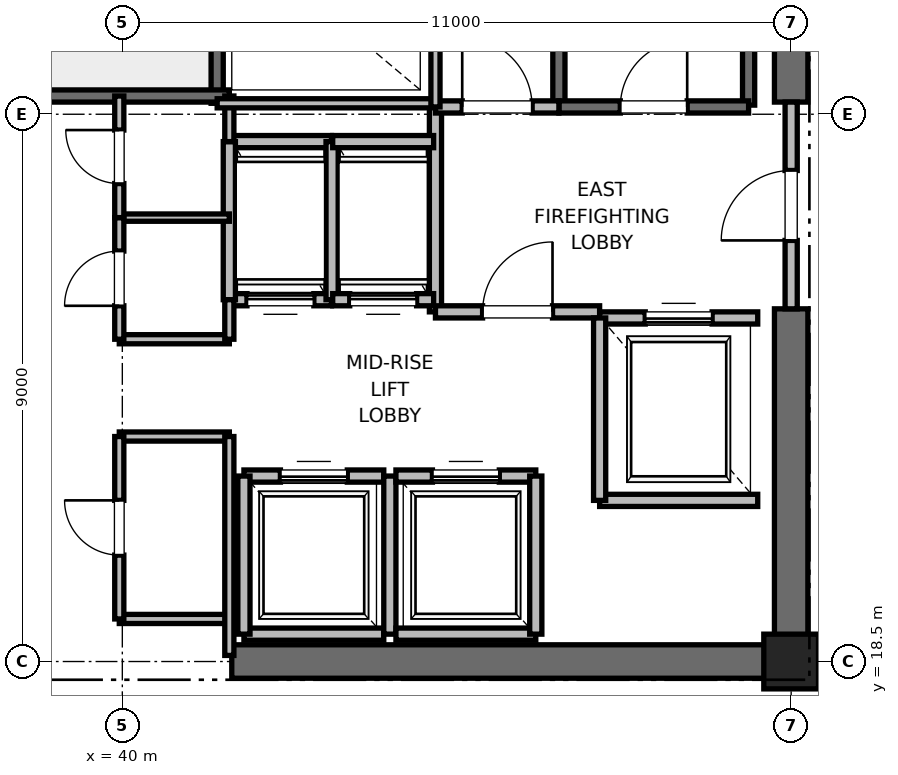
"""IFC4 building model, lengths in metres.
Left out: names, types, materials, properties, quantities, classifications, styles, units other than length and angle.
Written with IfcOpenShell. Run it as: python <this file> out.ifc"""

import sys

from ifc_helpers import new_model, si_unit, direction, frame, frame_2d, origin, origin_2d, place, context, subcontext, project, spatial, rectangle, extrude, element, fill, save


model = new_model("IFC4")
c1 = context("Model", 3, precision=1e-05, world=origin(), true_north=direction((0.0, 1.0)))
c2 = subcontext(c1, "Body", "Model", "MODEL_VIEW")
j1 = project(units=[si_unit("LENGTHUNIT", "METRE"), si_unit("PLANEANGLEUNIT", "RADIAN")], contexts=[c1])
p1 = place(None, origin())
s1 = spatial("IfcSite", under=j1, at=p1, CompositionType="ELEMENT")
p2 = place(p1, origin())
s2 = spatial("IfcBuilding", under=s1, at=p2, CompositionType="ELEMENT")
p3 = place(p2, frame((0.0, 0.0, 225.2)))
s3 = spatial("IfcBuildingStorey", under=s2, at=p3, CompositionType="ELEMENT", Elevation=225.2)
p4 = place(p3, frame((51.0, 18.5, 0.0), z_axis=(0.0, 0.0, 1.0), x_axis=(1.0, 0.0, 0.0)))
e1 = element("IfcColumn", 1, at=p4, inside=s3, PredefinedType="PILASTER", context=c2, shape_type="SweptSolid", body=[
    extrude(rectangle(XDim=0.9, YDim=0.9, at=origin_2d()), origin(), (0.0, 0.0, 1.0), 4.0),
])
p5 = place(p3, frame((41.8, 18.5, 0.0), z_axis=(0.0, 0.0, 1.0), x_axis=(1.0, 0.0, 0.0)))
e2 = element("IfcWall", 2, at=p5, inside=s3, PredefinedType="SHEAR", context=c2, shape_type="SweptSolid", body=[
    extrude(rectangle(XDim=9.2, YDim=0.55, at=frame_2d((4.6, 0.0))), origin(), (0.0, 0.0, 1.0), 3.775),
])
p6 = place(p3, frame((51.0, 18.5, 0.0), z_axis=(0.0, 0.0, 1.0), x_axis=(0.0, 1.0, 0.0)))
e3 = element("IfcWall", 3, at=p6, inside=s3, PredefinedType="SHEAR", context=c2, shape_type="SweptSolid", body=[
    extrude(rectangle(XDim=5.8, YDim=0.55, at=frame_2d((2.9, 0.0))), origin(), (0.0, 0.0, 1.0), 3.775),
])
p7 = place(p3, frame((51.0, 27.7, 0.0), z_axis=(0.0, 0.0, 1.0), x_axis=(0.0, 1.0, 0.0)))
e4 = element("IfcWall", 4, at=p7, inside=s3, PredefinedType="SHEAR", context=c2, shape_type="SweptSolid", body=[
    extrude(rectangle(XDim=8.8, YDim=0.55, at=frame_2d((4.4, 0.0))), origin(), (0.0, 0.0, 1.0), 3.775),
])
p8 = place(p3, frame((50.3, 27.65, 0.0), z_axis=(0.0, 0.0, 1.0), x_axis=(0.0, 1.0, 0.0)))
e5 = element("IfcWall", 5, at=p8, inside=s3, PredefinedType="SOLIDWALL", context=c2, shape_type="SweptSolid", body=[
    extrude(rectangle(XDim=8.15, YDim=0.2, at=frame_2d((4.075, 0.0))), origin(), (0.0, 0.0, 1.0), 3.775),
])
p9 = place(p3, frame((47.18, 27.62, 0.0), z_axis=(0.0, 0.0, 1.0), x_axis=(0.0, 1.0, 0.0)))
e6 = element("IfcWall", 6, at=p9, inside=s3, PredefinedType="SOLIDWALL", context=c2, shape_type="SweptSolid", body=[
    extrude(rectangle(XDim=8.18, YDim=0.2, at=frame_2d((4.09, 0.0))), origin(), (0.0, 0.0, 1.0), 3.775),
])
p10 = place(p3, frame((47.18, 27.62, 0.0), z_axis=(0.0, 0.0, 1.0), x_axis=(1.0, 0.0, 0.0)))
e7 = element("IfcWall", 7, at=p10, inside=s3, PredefinedType="SOLIDWALL", context=c2, shape_type="SweptSolid", body=[
    extrude(rectangle(XDim=3.12, YDim=0.2, at=frame_2d((1.56, 0.0))), origin(), (0.0, 0.0, 1.0), 3.775),
])
p11 = place(p10, frame((1.01, 0.0, 0.0)))
e8 = element("IfcOpeningElement", 8, at=p11, cuts=e7, PredefinedType="OPENING", context=c2, shape_type="SweptSolid", body=[
    extrude(rectangle(XDim=1.1, YDim=2.15, at=frame_2d((0.55, 1.075))), frame((0.0, 0.1, 0.0), z_axis=(0.0, -1.0, 0.0), x_axis=(1.0, 0.0, 0.0)), (0.0, 0.0, 1.0), 0.2),
])
p12 = place(p3, frame((41.56, 27.68, 0.0), z_axis=(0.0, 0.0, 1.0), x_axis=(0.0, 1.0, 0.0)))
e9 = element("IfcWall", 9, at=p12, inside=s3, PredefinedType="SOLIDWALL", context=c2, shape_type="SweptSolid", body=[
    extrude(rectangle(XDim=8.57, YDim=0.2, at=frame_2d((4.285, 0.0))), origin(), (0.0, 0.0, 1.0), 3.775),
])
p13 = place(p3, frame((38.44, 27.8, 0.0), z_axis=(0.0, 0.0, 1.0), x_axis=(1.0, 0.0, 0.0)))
e10 = element("IfcWall", 10, at=p13, inside=s3, PredefinedType="SOLIDWALL", context=c2, shape_type="SweptSolid", body=[
    extrude(rectangle(XDim=3.32, YDim=0.2, at=frame_2d((1.66, 0.0))), origin(), (0.0, 0.0, 1.0), 3.775),
])
p14 = place(p3, frame((45.15, 24.25, 0.0), z_axis=(0.0, 0.0, 1.0), x_axis=(0.0, 1.0, 0.0)))
e11 = element("IfcWall", 11, at=p14, inside=s3, PredefinedType="PARTITIONING", context=c2, shape_type="SweptSolid", body=[
    extrude(rectangle(XDim=3.37, YDim=0.2, at=frame_2d((1.685, 0.0))), origin(), (0.0, 0.0, 1.0), 3.775),
])
p15 = place(p3, frame((45.15, 24.25, 0.0), z_axis=(0.0, 0.0, 1.0), x_axis=(1.0, 0.0, 0.0)))
e12 = element("IfcWall", 12, at=p15, inside=s3, PredefinedType="PARTITIONING", context=c2, shape_type="SweptSolid", body=[
    extrude(rectangle(XDim=2.7, YDim=0.2, at=frame_2d((1.35, 0.0))), origin(), (0.0, 0.0, 1.0), 3.775),
])
p16 = place(p15, frame((0.775, 0.0, 0.0)))
e13 = element("IfcOpeningElement", 13, at=p16, cuts=e12, PredefinedType="OPENING", context=c2, shape_type="SweptSolid", body=[
    extrude(rectangle(XDim=1.15, YDim=2.2, at=frame_2d((0.575, 1.1))), frame((0.0, 0.1, 0.0), z_axis=(0.0, -1.0, 0.0), x_axis=(1.0, 0.0, 0.0)), (0.0, 0.0, 1.0), 0.2),
])
p17 = place(p3, frame((45.15, 27.62, 0.0), z_axis=(0.0, 0.0, 1.0), x_axis=(1.0, 0.0, 0.0)))
e14 = element("IfcWall", 14, at=p17, inside=s3, PredefinedType="PARTITIONING", context=c2, shape_type="SweptSolid", body=[
    extrude(rectangle(XDim=2.03, YDim=0.2, at=frame_2d((1.015, 0.0))), origin(), (0.0, 0.0, 1.0), 3.775),
])
p18 = place(p17, frame((0.44, 0.0, 0.0)))
e15 = element("IfcOpeningElement", 15, at=p18, cuts=e14, PredefinedType="OPENING", context=c2, shape_type="SweptSolid", body=[
    extrude(rectangle(XDim=1.15, YDim=2.2, at=frame_2d((0.575, 1.1))), frame((0.0, 0.1, 0.0), z_axis=(0.0, -1.0, 0.0), x_axis=(1.0, 0.0, 0.0)), (0.0, 0.0, 1.0), 0.2),
])
p19 = place(p3, frame((51.0, 24.3, 0.0), z_axis=(0.0, 0.0, 1.0), x_axis=(0.0, 1.0, 0.0)))
e16 = element("IfcWall", 16, at=p19, inside=s3, PredefinedType="PARTITIONING", context=c2, shape_type="SweptSolid", body=[
    extrude(rectangle(XDim=3.4, YDim=0.2, at=frame_2d((1.7, 0.0))), origin(), (0.0, 0.0, 1.0), 2.755),
])
p20 = place(p19, frame((1.125, 0.0, 0.0)))
e17 = element("IfcOpeningElement", 17, at=p20, cuts=e16, PredefinedType="OPENING", context=c2, shape_type="SweptSolid", body=[
    extrude(rectangle(XDim=1.15, YDim=2.2, at=frame_2d((0.575, 1.1))), frame((0.0, 0.1, 0.0), z_axis=(0.0, -1.0, 0.0), x_axis=(1.0, 0.0, 0.0)), (0.0, 0.0, 1.0), 0.2),
])
p21 = place(p3, frame((47.85, 21.15, 0.0), z_axis=(0.0, 0.0, 1.0), x_axis=(1.0, 0.0, 0.0)))
e18 = element("IfcWall", 18, at=p21, inside=s3, PredefinedType="SOLIDWALL", context=c2, shape_type="SweptSolid", body=[
    extrude(rectangle(XDim=2.6, YDim=0.2, at=frame_2d((1.3, 0.0))), origin(), (0.0, 0.0, 1.0), 3.775),
])
p22 = place(p3, frame((50.45, 24.15, 0.0), z_axis=(0.0, 0.0, 1.0), x_axis=(-1.0, 0.0, 0.0)))
e19 = element("IfcWall", 19, at=p22, inside=s3, PredefinedType="SOLIDWALL", context=c2, shape_type="SweptSolid", body=[
    extrude(rectangle(XDim=2.6, YDim=0.2, at=frame_2d((1.3, 0.0))), origin(), (0.0, 0.0, 1.0), 2.755),
])
p23 = place(p22, frame((0.75, 0.0, 0.0)))
e20 = element("IfcOpeningElement", 20, at=p23, cuts=e19, PredefinedType="OPENING", context=c2, shape_type="SweptSolid", body=[
    extrude(rectangle(XDim=1.1, YDim=2.2, at=frame_2d((0.55, 1.1))), frame((0.0, 0.1, 0.0), z_axis=(0.0, -1.0, 0.0), x_axis=(1.0, 0.0, 0.0)), (0.0, 0.0, 1.0), 0.2),
])
p24 = place(p3, frame((47.85, 24.15, 0.0), z_axis=(0.0, 0.0, 1.0), x_axis=(0.0, -1.0, 0.0)))
e21 = element("IfcWall", 21, at=p24, inside=s3, PredefinedType="SOLIDWALL", context=c2, shape_type="SweptSolid", body=[
    extrude(rectangle(XDim=3.0, YDim=0.2, at=frame_2d((1.5, 0.0))), origin(), (0.0, 0.0, 1.0), 3.775),
])
p25 = place(p3, frame((42.0, 18.95, 0.0), z_axis=(0.0, 0.0, 1.0), x_axis=(1.0, 0.0, 0.0)))
e22 = element("IfcWall", 22, at=p25, inside=s3, PredefinedType="SOLIDWALL", context=c2, shape_type="SweptSolid", body=[
    extrude(rectangle(XDim=2.3, YDim=0.2, at=frame_2d((1.15, 0.0))), origin(), (0.0, 0.0, 1.0), 2.755),
])
p26 = place(p3, frame((44.3, 21.55, 0.0), z_axis=(0.0, 0.0, 1.0), x_axis=(-1.0, 0.0, 0.0)))
e23 = element("IfcWall", 23, at=p26, inside=s3, PredefinedType="SOLIDWALL", context=c2, shape_type="SweptSolid", body=[
    extrude(rectangle(XDim=2.3, YDim=0.2, at=frame_2d((1.15, 0.0))), origin(), (0.0, 0.0, 1.0), 3.775),
])
p27 = place(p26, frame((0.6, 0.0, 0.0)))
e24 = element("IfcOpeningElement", 24, at=p27, cuts=e23, PredefinedType="OPENING", context=c2, shape_type="SweptSolid", body=[
    extrude(rectangle(XDim=1.1, YDim=2.2, at=frame_2d((0.55, 1.1))), frame((0.0, 0.1, 0.0), z_axis=(0.0, -1.0, 0.0), x_axis=(1.0, 0.0, 0.0)), (0.0, 0.0, 1.0), 0.2),
])
p28 = place(p3, frame((42.0, 21.55, 0.0), z_axis=(0.0, 0.0, 1.0), x_axis=(0.0, -1.0, 0.0)))
e25 = element("IfcWall", 25, at=p28, inside=s3, PredefinedType="SOLIDWALL", context=c2, shape_type="SweptSolid", body=[
    extrude(rectangle(XDim=2.6, YDim=0.2, at=frame_2d((1.3, 0.0))), origin(), (0.0, 0.0, 1.0), 2.755),
])
p29 = place(p3, frame((44.4, 18.95, 0.0), z_axis=(0.0, 0.0, 1.0), x_axis=(0.0, 1.0, 0.0)))
e26 = element("IfcWall", 26, at=p29, inside=s3, PredefinedType="SOLIDWALL", context=c2, shape_type="SweptSolid", body=[
    extrude(rectangle(XDim=2.6, YDim=0.2, at=frame_2d((1.3, 0.0))), origin(), (0.0, 0.0, 1.0), 3.775),
])
p30 = place(p3, frame((44.5, 18.95, 0.0), z_axis=(0.0, 0.0, 1.0), x_axis=(1.0, 0.0, 0.0)))
e27 = element("IfcWall", 27, at=p30, inside=s3, PredefinedType="SOLIDWALL", context=c2, shape_type="SweptSolid", body=[
    extrude(rectangle(XDim=2.3, YDim=0.2, at=frame_2d((1.15, 0.0))), origin(), (0.0, 0.0, 1.0), 3.775),
])
p31 = place(p3, frame((46.8, 21.55, 0.0), z_axis=(0.0, 0.0, 1.0), x_axis=(-1.0, 0.0, 0.0)))
e28 = element("IfcWall", 28, at=p31, inside=s3, PredefinedType="SOLIDWALL", context=c2, shape_type="SweptSolid", body=[
    extrude(rectangle(XDim=2.3, YDim=0.2, at=frame_2d((1.15, 0.0))), origin(), (0.0, 0.0, 1.0), 3.775),
])
p32 = place(p31, frame((0.6, 0.0, 0.0)))
e29 = element("IfcOpeningElement", 29, at=p32, cuts=e28, PredefinedType="OPENING", context=c2, shape_type="SweptSolid", body=[
    extrude(rectangle(XDim=1.1, YDim=2.2, at=frame_2d((0.55, 1.1))), frame((0.0, 0.1, 0.0), z_axis=(0.0, -1.0, 0.0), x_axis=(1.0, 0.0, 0.0)), (0.0, 0.0, 1.0), 0.2),
])
p33 = place(p3, frame((46.8, 18.95, 0.0), z_axis=(0.0, 0.0, 1.0), x_axis=(0.0, 1.0, 0.0)))
e30 = element("IfcWall", 30, at=p33, inside=s3, PredefinedType="SOLIDWALL", context=c2, shape_type="SweptSolid", body=[
    extrude(rectangle(XDim=2.6, YDim=0.2, at=frame_2d((1.3, 0.0))), origin(), (0.0, 0.0, 1.0), 3.775),
])
p34 = place(p3, frame((41.76, 24.45, 0.0), z_axis=(0.0, 0.0, 1.0), x_axis=(1.0, 0.0, 0.0)))
e31 = element("IfcWall", 31, at=p34, inside=s3, PredefinedType="SOLIDWALL", context=c2, shape_type="SweptSolid", body=[
    extrude(rectangle(XDim=1.68, YDim=0.2, at=frame_2d((0.84, 0.0))), origin(), (0.0, 0.0, 1.0), 3.775),
])
p35 = place(p34, frame((0.29, 0.0, 0.0)))
e32 = element("IfcOpeningElement", 32, at=p35, cuts=e31, PredefinedType="OPENING", context=c2, shape_type="SweptSolid", body=[
    extrude(rectangle(XDim=1.1, YDim=2.2, at=frame_2d((0.55, 1.1))), frame((0.0, 0.1, 0.0), z_axis=(0.0, -1.0, 0.0), x_axis=(1.0, 0.0, 0.0)), (0.0, 0.0, 1.0), 0.2),
])
p36 = place(p3, frame((43.44, 27.05, 0.0), z_axis=(0.0, 0.0, 1.0), x_axis=(-1.0, 0.0, 0.0)))
e33 = element("IfcWall", 33, at=p36, inside=s3, PredefinedType="SOLIDWALL", context=c2, shape_type="SweptSolid", body=[
    extrude(rectangle(XDim=1.68, YDim=0.2, at=frame_2d((0.84, 0.0))), origin(), (0.0, 0.0, 1.0), 3.775),
])
for number, where, z_axis, x_axis in (
    (34, (41.76, 27.05, 0.0), (0.0, 0.0, 1.0), (0.0, -1.0, 0.0)),
    (35, (43.45, 24.45, 0.0), (0.0, 0.0, 1.0), (0.0, 1.0, 0.0)),
):
    element("IfcWall", number, at=place(p3, frame(where, z_axis=z_axis, x_axis=x_axis)), inside=s3, PredefinedType="SOLIDWALL", context=c2, shape_type="SweptSolid", body=[
        extrude(rectangle(XDim=2.6, YDim=0.2, at=frame_2d((1.3, 0.0))), origin(), (0.0, 0.0, 1.0), 3.775),
    ])
p37 = place(p3, frame((43.46, 24.45, 0.0), z_axis=(0.0, 0.0, 1.0), x_axis=(1.0, 0.0, 0.0)))
e36 = element("IfcWall", 36, at=p37, inside=s3, PredefinedType="SOLIDWALL", context=c2, shape_type="SweptSolid", body=[
    extrude(rectangle(XDim=1.66, YDim=0.2, at=frame_2d((0.83, 0.0))), origin(), (0.0, 0.0, 1.0), 3.775),
])
p38 = place(p37, frame((0.28, 0.0, 0.0)))
e37 = element("IfcOpeningElement", 37, at=p38, cuts=e36, PredefinedType="OPENING", context=c2, shape_type="SweptSolid", body=[
    extrude(rectangle(XDim=1.1, YDim=2.2, at=frame_2d((0.55, 1.1))), frame((0.0, 0.1, 0.0), z_axis=(0.0, -1.0, 0.0), x_axis=(1.0, 0.0, 0.0)), (0.0, 0.0, 1.0), 0.2),
])
p39 = place(p3, frame((45.12, 27.05, 0.0), z_axis=(0.0, 0.0, 1.0), x_axis=(-1.0, 0.0, 0.0)))
e38 = element("IfcWall", 38, at=p39, inside=s3, PredefinedType="SOLIDWALL", context=c2, shape_type="SweptSolid", body=[
    extrude(rectangle(XDim=1.66, YDim=0.2, at=frame_2d((0.83, 0.0))), origin(), (0.0, 0.0, 1.0), 3.775),
])
for number, where, z_axis, x_axis in (
    (39, (39.95, 19.2, 0.0), (0.0, 0.0, 1.0), (1.0, 0.0, 0.0)),
    (40, (39.95, 22.2, 0.0), (0.0, 0.0, 1.0), (1.0, 0.0, 0.0)),
    (41, (39.95, 23.8, 0.0), (0.0, 0.0, 1.0), (1.0, 0.0, 0.0)),
):
    element("IfcWall", number, at=place(p3, frame(where, z_axis=z_axis, x_axis=x_axis)), inside=s3, PredefinedType="PARTITIONING", context=c2, shape_type="SweptSolid", body=[
        extrude(rectangle(XDim=1.81, YDim=0.15, at=frame_2d((0.905, 0.0))), origin(), (0.0, 0.0, 1.0), 2.85),
    ])
p40 = place(p3, frame((39.95, 25.8, 0.0), z_axis=(0.0, 0.0, 1.0), x_axis=(1.0, 0.0, 0.0)))
e42 = element("IfcWall", 42, at=p40, inside=s3, PredefinedType="PARTITIONING", context=c2, shape_type="SweptSolid", body=[
    extrude(rectangle(XDim=1.81, YDim=0.12, at=frame_2d((0.905, 0.0))), origin(), (0.0, 0.0, 1.0), 2.85),
])
p41 = place(p3, frame((41.76, 18.6, 0.0), z_axis=(0.0, 0.0, 1.0), x_axis=(0.0, 1.0, 0.0)))
e43 = element("IfcWall", 43, at=p41, inside=s3, PredefinedType="PARTITIONING", context=c2, shape_type="SweptSolid", body=[
    extrude(rectangle(XDim=3.6, YDim=0.15, at=frame_2d((1.8, 0.0))), origin(), (0.0, 0.0, 1.0), 2.755),
])
p42 = place(p3, frame((41.76, 23.8, 0.0), z_axis=(0.0, 0.0, 1.0), x_axis=(0.0, 1.0, 0.0)))
e44 = element("IfcWall", 44, at=p42, inside=s3, PredefinedType="PARTITIONING", context=c2, shape_type="SweptSolid", body=[
    extrude(rectangle(XDim=0.65, YDim=0.15, at=frame_2d((0.325, 0.0))), origin(), (0.0, 0.0, 1.0), 2.85),
])
p43 = place(p3, frame((41.76, 27.05, 0.0), z_axis=(0.0, 0.0, 1.0), x_axis=(0.0, 1.0, 0.0)))
e45 = element("IfcWall", 45, at=p43, inside=s3, PredefinedType="PARTITIONING", context=c2, shape_type="SweptSolid", body=[
    extrude(rectangle(XDim=0.75, YDim=0.15, at=frame_2d((0.375, 0.0))), origin(), (0.0, 0.0, 1.0), 2.85),
])
p44 = place(p3, frame((39.95, 19.2, 0.0), z_axis=(0.0, 0.0, 1.0), x_axis=(0.0, 1.0, 0.0)))
e46 = element("IfcWall", 46, at=p44, inside=s3, PredefinedType="PARTITIONING", context=c2, shape_type="SweptSolid", body=[
    extrude(rectangle(XDim=3.0, YDim=0.15, at=frame_2d((1.5, 0.0))), origin(), (0.0, 0.0, 1.0), 2.85),
])
p45 = place(p44, frame((1.05, 0.0, 0.0)))
e47 = element("IfcOpeningElement", 47, at=p45, cuts=e46, PredefinedType="OPENING", context=c2, shape_type="SweptSolid", body=[
    extrude(rectangle(XDim=0.9, YDim=2.1, at=frame_2d((0.45, 1.05))), frame((0.0, 0.075, 0.0), z_axis=(0.0, -1.0, 0.0), x_axis=(1.0, 0.0, 0.0)), (0.0, 0.0, 1.0), 0.15),
])
p46 = place(p3, frame((39.95, 23.8, 0.0), z_axis=(0.0, 0.0, 1.0), x_axis=(0.0, 1.0, 0.0)))
e48 = element("IfcWall", 48, at=p46, inside=s3, PredefinedType="PARTITIONING", context=c2, shape_type="SweptSolid", body=[
    extrude(rectangle(XDim=2.0, YDim=0.15, at=frame_2d((1.0, 0.0))), origin(), (0.0, 0.0, 1.0), 2.85),
])
p47 = place(p46, frame((0.55, 0.0, 0.0)))
e49 = element("IfcOpeningElement", 49, at=p47, cuts=e48, PredefinedType="OPENING", context=c2, shape_type="SweptSolid", body=[
    extrude(rectangle(XDim=0.9, YDim=2.1, at=frame_2d((0.45, 1.05))), frame((0.0, 0.075, 0.0), z_axis=(0.0, -1.0, 0.0), x_axis=(1.0, 0.0, 0.0)), (0.0, 0.0, 1.0), 0.15),
])
p48 = place(p3, frame((39.95, 25.8, 0.0), z_axis=(0.0, 0.0, 1.0), x_axis=(0.0, 1.0, 0.0)))
e50 = element("IfcWall", 50, at=p48, inside=s3, PredefinedType="PARTITIONING", context=c2, shape_type="SweptSolid", body=[
    extrude(rectangle(XDim=2.0, YDim=0.15, at=frame_2d((1.0, 0.0))), origin(), (0.0, 0.0, 1.0), 2.85),
])
p49 = place(p48, frame((0.56, 0.0, 0.0)))
e51 = element("IfcOpeningElement", 51, at=p49, cuts=e50, PredefinedType="OPENING", context=c2, shape_type="SweptSolid", body=[
    extrude(rectangle(XDim=0.88, YDim=2.1, at=frame_2d((0.44, 1.05))), frame((0.0, 0.075, 0.0), z_axis=(0.0, -1.0, 0.0), x_axis=(1.0, 0.0, 0.0)), (0.0, 0.0, 1.0), 0.15),
])
p50 = place(p3, frame((41.56, 27.68, 0.0), z_axis=(0.0, 0.0, 1.0), x_axis=(1.0, 0.0, 0.0)))
e52 = element("IfcWall", 52, at=p50, inside=s3, PredefinedType="PARTITIONING", context=c2, shape_type="SweptSolid", body=[
    extrude(rectangle(XDim=3.59, YDim=0.15, at=frame_2d((1.795, 0.0))), origin(), (0.0, 0.0, 1.0), 2.85),
])
p51 = place(p3, frame((45.15, 27.62, 0.0), z_axis=(0.0, 0.0, 1.0), x_axis=(0.0, 1.0, 0.0)))
e53 = element("IfcWall", 53, at=p51, inside=s3, PredefinedType="PARTITIONING", context=c2, shape_type="SweptSolid", body=[
    extrude(rectangle(XDim=3.1, YDim=0.15, at=frame_2d((1.55, 0.0))), origin(), (0.0, 0.0, 1.0), 2.85),
])
p52 = place(p11, origin())
e54 = element("IfcDoor", 54, at=p52, inside=s3, OperationType="SINGLE_SWING_RIGHT", PredefinedType="DOOR", context=c2, shape_type="SweptSolid", body=[
    extrude(rectangle(XDim=1.1, YDim=2.15, at=frame_2d((0.55, 1.075))), frame((0.0, 0.025, 0.0), z_axis=(0.0, -1.0, 0.0), x_axis=(1.0, 0.0, 0.0)), (0.0, 0.0, 1.0), 0.05),
])
fill(e8, e54)
p53 = place(p16, origin())
e55 = element("IfcDoor", 55, at=p53, inside=s3, OperationType="SINGLE_SWING_RIGHT", PredefinedType="DOOR", context=c2, shape_type="SweptSolid", body=[
    extrude(rectangle(XDim=1.15, YDim=2.2, at=frame_2d((0.575, 1.1))), frame((0.0, 0.025, 0.0), z_axis=(0.0, -1.0, 0.0), x_axis=(1.0, 0.0, 0.0)), (0.0, 0.0, 1.0), 0.05),
])
fill(e13, e55)
p54 = place(p18, origin())
e56 = element("IfcDoor", 56, at=p54, inside=s3, OperationType="SINGLE_SWING_LEFT", PredefinedType="DOOR", context=c2, shape_type="SweptSolid", body=[
    extrude(rectangle(XDim=1.15, YDim=2.2, at=frame_2d((0.575, 1.1))), frame((0.0, 0.025, 0.0), z_axis=(0.0, -1.0, 0.0), x_axis=(1.0, 0.0, 0.0)), (0.0, 0.0, 1.0), 0.05),
])
fill(e15, e56)
p55 = place(p20, origin())
e57 = element("IfcDoor", 57, at=p55, inside=s3, OperationType="SINGLE_SWING_LEFT", PredefinedType="DOOR", context=c2, shape_type="SweptSolid", body=[
    extrude(rectangle(XDim=1.15, YDim=2.2, at=frame_2d((0.575, 1.1))), frame((0.0, 0.025, 0.0), z_axis=(0.0, -1.0, 0.0), x_axis=(1.0, 0.0, 0.0)), (0.0, 0.0, 1.0), 0.05),
])
fill(e17, e57)
p56 = place(p23, origin())
e58 = element("IfcDoor", 58, at=p56, inside=s3, OperationType="SLIDING_TO_RIGHT", PredefinedType="DOOR", context=c2, shape_type="SweptSolid", body=[
    extrude(rectangle(XDim=1.1, YDim=2.2, at=frame_2d((0.55, 1.1))), frame((0.0, 0.025, 0.0), z_axis=(0.0, -1.0, 0.0), x_axis=(1.0, 0.0, 0.0)), (0.0, 0.0, 1.0), 0.05),
])
fill(e20, e58)
p57 = place(p27, origin())
e59 = element("IfcDoor", 59, at=p57, inside=s3, OperationType="SLIDING_TO_RIGHT", PredefinedType="DOOR", context=c2, shape_type="SweptSolid", body=[
    extrude(rectangle(XDim=1.1, YDim=2.2, at=frame_2d((0.55, 1.1))), frame((0.0, 0.025, 0.0), z_axis=(0.0, -1.0, 0.0), x_axis=(1.0, 0.0, 0.0)), (0.0, 0.0, 1.0), 0.05),
])
fill(e24, e59)
p58 = place(p32, origin())
e60 = element("IfcDoor", 60, at=p58, inside=s3, OperationType="SLIDING_TO_RIGHT", PredefinedType="DOOR", context=c2, shape_type="SweptSolid", body=[
    extrude(rectangle(XDim=1.1, YDim=2.2, at=frame_2d((0.55, 1.1))), frame((0.0, 0.025, 0.0), z_axis=(0.0, -1.0, 0.0), x_axis=(1.0, 0.0, 0.0)), (0.0, 0.0, 1.0), 0.05),
])
fill(e29, e60)
p59 = place(p35, origin())
e61 = element("IfcDoor", 61, at=p59, inside=s3, OperationType="SLIDING_TO_RIGHT", PredefinedType="DOOR", context=c2, shape_type="SweptSolid", body=[
    extrude(rectangle(XDim=1.1, YDim=2.2, at=frame_2d((0.55, 1.1))), frame((0.0, 0.025, 0.0), z_axis=(0.0, -1.0, 0.0), x_axis=(1.0, 0.0, 0.0)), (0.0, 0.0, 1.0), 0.05),
])
fill(e32, e61)
p60 = place(p38, origin())
e62 = element("IfcDoor", 62, at=p60, inside=s3, OperationType="SLIDING_TO_RIGHT", PredefinedType="DOOR", context=c2, shape_type="SweptSolid", body=[
    extrude(rectangle(XDim=1.1, YDim=2.2, at=frame_2d((0.55, 1.1))), frame((0.0, 0.025, 0.0), z_axis=(0.0, -1.0, 0.0), x_axis=(1.0, 0.0, 0.0)), (0.0, 0.0, 1.0), 0.05),
])
fill(e37, e62)
p61 = place(p45, origin())
e63 = element("IfcDoor", 63, at=p61, inside=s3, OperationType="SINGLE_SWING_RIGHT", PredefinedType="DOOR", context=c2, shape_type="SweptSolid", body=[
    extrude(rectangle(XDim=0.9, YDim=2.1, at=frame_2d((0.45, 1.05))), frame((0.0, 0.025, 0.0), z_axis=(0.0, -1.0, 0.0), x_axis=(1.0, 0.0, 0.0)), (0.0, 0.0, 1.0), 0.05),
])
fill(e47, e63)
p62 = place(p47, origin())
e64 = element("IfcDoor", 64, at=p62, inside=s3, OperationType="SINGLE_SWING_LEFT", PredefinedType="DOOR", context=c2, shape_type="SweptSolid", body=[
    extrude(rectangle(XDim=0.9, YDim=2.1, at=frame_2d((0.45, 1.05))), frame((0.0, 0.025, 0.0), z_axis=(0.0, -1.0, 0.0), x_axis=(1.0, 0.0, 0.0)), (0.0, 0.0, 1.0), 0.05),
])
fill(e49, e64)
p63 = place(p49, origin())
e65 = element("IfcDoor", 65, at=p63, inside=s3, OperationType="SINGLE_SWING_RIGHT", PredefinedType="DOOR", context=c2, shape_type="SweptSolid", body=[
    extrude(rectangle(XDim=0.88, YDim=2.1, at=frame_2d((0.44, 1.05))), frame((0.0, 0.025, 0.0), z_axis=(0.0, -1.0, 0.0), x_axis=(1.0, 0.0, 0.0)), (0.0, 0.0, 1.0), 0.05),
])
fill(e51, e65)
save(model, sys.argv[1])
